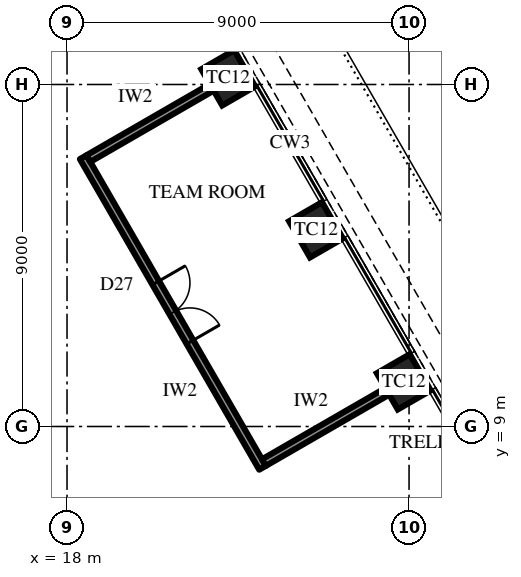
"""IFC4 building model, lengths in metres.
Left out: names, types, materials, properties, quantities, classifications, styles, units other than length and angle.
Written with IfcOpenShell. Run it as: python <this file> out.ifc"""

import sys

from ifc_helpers import new_model, si_unit, direction, frame, frame_2d, origin, origin_2d, place, context, subcontext, project, spatial, rectangle, extrude, element, fill, save


model = new_model("IFC4")
c1 = context("Model", 3, precision=1e-05, world=origin(), true_north=direction((0.0, 1.0)))
c2 = subcontext(c1, "Body", "Model", "MODEL_VIEW")
j1 = project(units=[si_unit("LENGTHUNIT", "METRE"), si_unit("PLANEANGLEUNIT", "RADIAN")], contexts=[c1])
p1 = place(None, origin())
s1 = spatial("IfcSite", under=j1, at=p1, CompositionType="ELEMENT")
p2 = place(p1, origin())
s2 = spatial("IfcBuilding", under=s1, at=p2, CompositionType="ELEMENT")
p3 = place(p2, frame((0.0, 0.0, 282.7)))
s3 = spatial("IfcBuildingStorey", under=s2, at=p3, CompositionType="ELEMENT", Elevation=282.7)
for number, where, z_axis, x_axis in (
    (1, (26.861, 10.175, 0.0), (0.0, 0.0, 1.0), (-0.5, 0.866, 0.0)),
    (2, (24.552, 14.175, 0.0), (0.0, 0.0, 1.0), (-0.5, 0.866, 0.0)),
    (3, (22.242, 18.175, 0.0), (0.0, 0.0, 1.0), (-0.5, 0.866, 0.0)),
):
    element("IfcColumn", number, at=place(p3, frame(where, z_axis=z_axis, x_axis=x_axis)), inside=s3, PredefinedType="COLUMN", context=c2, shape_type="SweptSolid", body=[
        extrude(rectangle(XDim=1.1, YDim=1.0, at=origin_2d()), origin(), (0.0, 0.0, 1.0), 4.2),
    ])
p4 = place(p3, frame((23.144, 7.913, 0.0), z_axis=(0.0, 0.0, 1.0), x_axis=(-0.499989672313, 0.866031366395, 0.0)))
e4 = element("IfcWall", 4, at=p4, inside=s3, PredefinedType="PARTITIONING", context=c2, shape_type="SweptSolid", body=[
    extrude(rectangle(XDim=9.438, YDim=0.2, at=frame_2d((4.719, 0.0))), origin(), (0.0, 0.0, 1.0), 4.0),
])
p5 = place(p4, frame((3.819, 0.0, 0.0)))
e5 = element("IfcOpeningElement", 5, at=p5, cuts=e4, PredefinedType="OPENING", context=c2, shape_type="SweptSolid", body=[
    extrude(rectangle(XDim=1.8, YDim=2.4, at=frame_2d((0.9, 1.2))), frame((0.0, 0.11, 0.0), z_axis=(0.0, -1.0, 0.0), x_axis=(1.0, 0.0, 0.0)), (0.0, 0.0, 1.0), 0.22),
])
for number, where, z_axis, x_axis in (
    (6, (23.181, 8.05, 0.0), (0.0, 0.0, 1.0), (0.866, 0.5, 0.0)),
    (7, (18.562, 16.05, 0.0), (0.0, 0.0, 1.0), (0.866, 0.5, 0.0)),
):
    element("IfcWall", number, at=place(p3, frame(where, z_axis=z_axis, x_axis=x_axis)), inside=s3, PredefinedType="PARTITIONING", context=c2, shape_type="SweptSolid", body=[
        extrude(rectangle(XDim=3.75, YDim=0.2, at=frame_2d((1.875, 0.0))), origin(), (0.0, 0.0, 1.0), 3.082),
    ])
p6 = place(p5, frame((1.8, 0.0, 0.0), z_axis=(0.0, 0.0, 1.0), x_axis=(-1.0, 0.0, 0.0)))
e8 = element("IfcDoor", 8, at=p6, inside=s3, OperationType="DOUBLE_DOOR_SINGLE_SWING", PredefinedType="DOOR", context=c2, shape_type="SweptSolid", body=[
    extrude(rectangle(XDim=1.8, YDim=2.4, at=frame_2d((0.9, 1.2))), frame((0.0, 0.025, 0.0), z_axis=(0.0, -1.0, 0.0), x_axis=(1.0, 0.0, 0.0)), (0.0, 0.0, 1.0), 0.05),
])
fill(e5, e8)
save(model, sys.argv[1])
